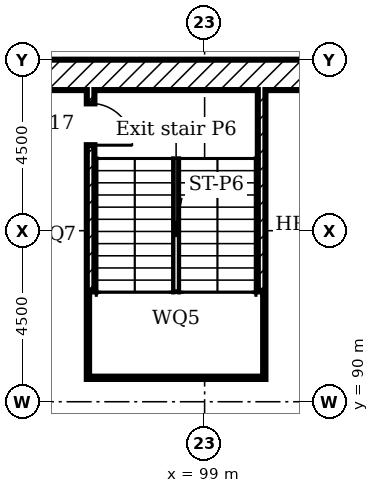
"""IFC4 building model, lengths in metres.
Left out: names, types, materials, properties, quantities, classifications, styles, units other than length and angle.
Written with IfcOpenShell. Run it as: python <this file> out.ifc"""

import sys

from ifc_helpers import new_model, si_unit, direction, frame, frame_2d, origin, place, context, subcontext, project, spatial, rectangle, extrude, element, fill, save


model = new_model("IFC4")
c1 = context("Model", 3, precision=1e-05, world=origin(), true_north=direction((0.0, 1.0)))
c2 = subcontext(c1, "Body", "Model", "MODEL_VIEW")
j1 = project(units=[si_unit("LENGTHUNIT", "METRE"), si_unit("PLANEANGLEUNIT", "RADIAN")], contexts=[c1])
p1 = place(None, origin())
s1 = spatial("IfcSite", under=j1, at=p1, CompositionType="ELEMENT")
p2 = place(p1, origin())
s2 = spatial("IfcBuilding", under=s1, at=p2, CompositionType="ELEMENT")
p3 = place(p2, frame((0.0, 0.0, -8.0)))
s3 = spatial("IfcBuildingStorey", under=s2, at=p3, CompositionType="ELEMENT", Elevation=-8.0)
p4 = place(p3, frame((0.0, 98.6, 0.0)))
e1 = element("IfcWall", 1, at=p4, inside=s3, PredefinedType="SOLIDWALL", context=c2, shape_type="SweptSolid", body=[
    extrude(rectangle(XDim=153.0, YDim=0.8, at=frame_2d((76.5, 0.0))), origin(), (0.0, 0.0, 1.0), 4.0),
])
p5 = place(p3, frame((96.0, 90.6, 0.0), z_axis=(0.0, 0.0, 1.0), x_axis=(0.0, 1.0, 0.0)))
e2 = element("IfcWall", 2, at=p5, inside=s3, PredefinedType="SOLIDWALL", context=c2, shape_type="SweptSolid", body=[
    extrude(rectangle(XDim=7.6, YDim=0.2, at=frame_2d((3.8, 0.0))), origin(), (0.0, 0.0, 1.0), 3.55),
])
p6 = place(p5, frame((6.15, 0.0, 0.0)))
e3 = element("IfcOpeningElement", 3, at=p6, cuts=e2, PredefinedType="OPENING", context=c2, shape_type="SweptSolid", body=[
    extrude(rectangle(XDim=1.1, YDim=2.1, at=frame_2d((0.55, 1.05))), frame((0.0, 0.11, 0.0), z_axis=(0.0, -1.0, 0.0), x_axis=(1.0, 0.0, 0.0)), (0.0, 0.0, 1.0), 0.22),
])
p7 = place(p3, frame((100.5, 90.6, 0.0), z_axis=(0.0, 0.0, 1.0), x_axis=(0.0, 1.0, 0.0)))
e4 = element("IfcWall", 4, at=p7, inside=s3, PredefinedType="SOLIDWALL", context=c2, shape_type="SweptSolid", body=[
    extrude(rectangle(XDim=7.6, YDim=0.2, at=frame_2d((3.8, 0.0))), origin(), (0.0, 0.0, 1.0), 3.55),
])
p8 = place(p3, frame((96.1, 90.7, 0.0)))
e5 = element("IfcWall", 5, at=p8, inside=s3, PredefinedType="SOLIDWALL", context=c2, shape_type="SweptSolid", body=[
    extrude(rectangle(XDim=4.3, YDim=0.2, at=frame_2d((2.15, 0.0))), origin(), (0.0, 0.0, 1.0), 3.55),
])
for number, where, z_axis, x_axis in (
    (6, (100.4, 92.78, 0.0), (0.0, 0.0, 1.0), (-1.0, 0.0, 0.0)),
    (7, (100.4, 91.4, 0.0), (0.0, 0.0, 1.0), (-1.0, 0.0, 0.0)),
):
    element("IfcWall", number, at=place(p3, frame(where, z_axis=z_axis, x_axis=x_axis)), inside=s3, PredefinedType="SOLIDWALL", context=c2, shape_type="SweptSolid", body=[
        extrude(rectangle(XDim=4.3, YDim=0.2, at=frame_2d((2.15, 0.0))), origin(), (0.0, 0.0, 1.0), 1.8),
    ])
p9 = place(p6, frame((1.1, 0.0, 0.0), x_axis=(-1.0, 0.0, 0.0)))
e8 = element("IfcDoor", 8, at=p9, inside=s3, OperationType="SINGLE_SWING_LEFT", PredefinedType="DOOR", context=c2, shape_type="SweptSolid", body=[
    extrude(rectangle(XDim=1.1, YDim=2.1, at=frame_2d((0.55, 1.05))), frame((0.0, 0.025, 0.0), z_axis=(0.0, -1.0, 0.0), x_axis=(1.0, 0.0, 0.0)), (0.0, 0.0, 1.0), 0.05),
])
fill(e3, e8)
save(model, sys.argv[1])
